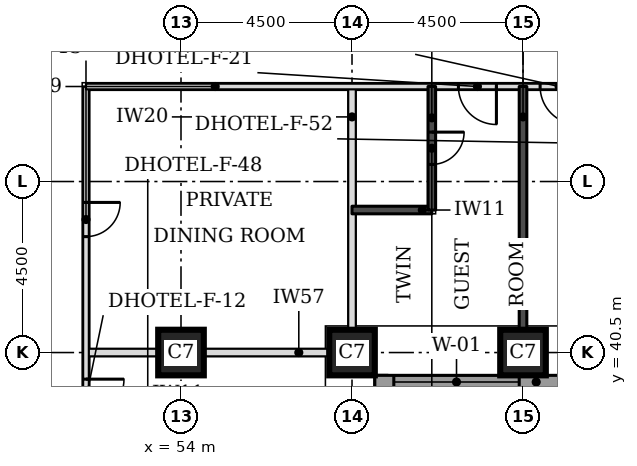
"""IFC4 building model, lengths in metres.
Left out: names, types, materials, properties, quantities, classifications, styles, units other than length and angle.
Written with IfcOpenShell. Run it as: python <this file> out.ifc"""

import sys

from ifc_helpers import new_model, si_unit, direction, frame, frame_2d, origin, origin_2d, place, context, subcontext, project, spatial, rectangle, extrude, element, fill, save


model = new_model("IFC4")
c1 = context("Model", 3, precision=1e-05, world=origin(), true_north=direction((0.0, 1.0)))
c2 = subcontext(c1, "Body", "Model", "MODEL_VIEW")
j1 = project(units=[si_unit("LENGTHUNIT", "METRE"), si_unit("PLANEANGLEUNIT", "RADIAN")], contexts=[c1])
p1 = place(None, origin())
s1 = spatial("IfcSite", under=j1, at=p1, CompositionType="ELEMENT")
p2 = place(p1, origin())
s2 = spatial("IfcBuilding", under=s1, at=p2, CompositionType="ELEMENT")
p3 = place(p2, frame((0.0, 0.0, 42.9)))
s3 = spatial("IfcBuildingStorey", under=s2, at=p3, CompositionType="ELEMENT", Elevation=42.9)
for number, where, z_axis, x_axis in (
    (1, (54.0, 40.5, 0.0), (0.0, 0.0, 1.0), (1.0, 0.0, 0.0)),
    (2, (58.5, 40.5, 0.0), (0.0, 0.0, 1.0), (1.0, 0.0, 0.0)),
    (3, (63.0, 40.5, 0.0), (0.0, 0.0, 1.0), (1.0, 0.0, 0.0)),
):
    element("IfcColumn", number, at=place(p3, frame(where, z_axis=z_axis, x_axis=x_axis)), inside=s3, PredefinedType="COLUMN", context=c2, shape_type="SweptSolid", body=[
        extrude(rectangle(XDim=1.2, YDim=1.2, at=origin_2d()), origin(), (0.0, 0.0, 1.0), 3.3),
    ])
p4 = place(p3, frame((59.275, 22.106, 0.0), z_axis=(0.0, 0.0, 1.0), x_axis=(0.0, 1.0, 0.0)))
e4 = element("IfcWall", 4, at=p4, inside=s3, PredefinedType="STANDARD", context=c2, shape_type="SweptSolid", body=[
    extrude(rectangle(XDim=17.793, YDim=0.35, at=frame_2d((8.897, 0.0))), origin(), (0.0, 0.0, 1.0), 3.055),
])
p5 = place(p4, frame((5.493, 0.0, 0.8)))
e5 = element("IfcOpeningElement", 5, at=p5, cuts=e4, PredefinedType="OPENING", context=c2, shape_type="SweptSolid", body=[
    extrude(rectangle(XDim=3.3, YDim=1.5, at=frame_2d((1.65, 0.75))), frame((0.0, 0.185, 0.0), z_axis=(0.0, -1.0, 0.0), x_axis=(1.0, 0.0, 0.0)), (0.0, 0.0, 1.0), 0.37),
])
p6 = place(p4, frame((13.993, 0.0, 0.8)))
e6 = element("IfcOpeningElement", 6, at=p6, cuts=e4, PredefinedType="OPENING", context=c2, shape_type="SweptSolid", body=[
    extrude(rectangle(XDim=3.3, YDim=1.5, at=frame_2d((1.65, 0.75))), frame((0.0, 0.185, 0.0), z_axis=(0.0, -1.0, 0.0), x_axis=(1.0, 0.0, 0.0)), (0.0, 0.0, 1.0), 0.37),
])
p7 = place(p3, frame((59.1, 39.725, 0.0), z_axis=(0.0, 0.0, 1.0), x_axis=(1.0, 0.0, 0.0)))
e7 = element("IfcWall", 7, at=p7, inside=s3, PredefinedType="STANDARD", context=c2, shape_type="SweptSolid", body=[
    extrude(rectangle(XDim=13.293, YDim=0.35, at=frame_2d((6.647, 0.0))), origin(), (0.0, 0.0, 1.0), 3.055),
])
p8 = place(p7, frame((0.5, 0.0, 0.8)))
e8 = element("IfcOpeningElement", 8, at=p8, cuts=e7, PredefinedType="OPENING", context=c2, shape_type="SweptSolid", body=[
    extrude(rectangle(XDim=3.3, YDim=1.5, at=frame_2d((1.65, 0.75))), frame((0.0, 0.185, 0.0), z_axis=(0.0, -1.0, 0.0), x_axis=(1.0, 0.0, 0.0)), (0.0, 0.0, 1.0), 0.37),
])
p9 = place(p3, frame((51.5, 40.5, 0.0), z_axis=(0.0, 0.0, 1.0), x_axis=(1.0, 0.0, 0.0)))
e9 = element("IfcWall", 9, at=p9, inside=s3, PredefinedType="PARTITIONING", context=c2, shape_type="SweptSolid", body=[
    extrude(rectangle(XDim=6.4, YDim=0.2, at=frame_2d((3.2, 0.0))), origin(), (0.0, 0.0, 1.0), 2.33),
])
p10 = place(p3, frame((58.5, 41.1, 0.0), z_axis=(0.0, 0.0, 1.0), x_axis=(0.0, 1.0, 0.0)))
e10 = element("IfcWall", 10, at=p10, inside=s3, PredefinedType="PARTITIONING", context=c2, shape_type="SweptSolid", body=[
    extrude(rectangle(XDim=6.4, YDim=0.2, at=frame_2d((3.2, 0.0))), origin(), (0.0, 0.0, 1.0), 3.08),
])
p11 = place(p3, frame((51.5, 23.65, 0.0), z_axis=(0.0, 0.0, 1.0), x_axis=(0.0, 1.0, 0.0)))
e11 = element("IfcWall", 11, at=p11, inside=s3, PredefinedType="PARTITIONING", context=c2, shape_type="SweptSolid", body=[
    extrude(rectangle(XDim=23.85, YDim=0.15, at=frame_2d((11.925, 0.0))), origin(), (0.0, 0.0, 1.0), 3.08),
])
p12 = place(p11, frame((1.65, 0.0, 0.0)))
e12 = element("IfcOpeningElement", 12, at=p12, cuts=e11, PredefinedType="OPENING", context=c2, shape_type="SweptSolid", body=[
    extrude(rectangle(XDim=1.0, YDim=2.1, at=frame_2d((0.5, 1.05))), frame((0.0, 0.085, 0.0), z_axis=(0.0, -1.0, 0.0), x_axis=(1.0, 0.0, 0.0)), (0.0, 0.0, 1.0), 0.17),
])
p13 = place(p11, frame((5.75, 0.0, 0.0)))
e13 = element("IfcOpeningElement", 13, at=p13, cuts=e11, PredefinedType="OPENING", context=c2, shape_type="SweptSolid", body=[
    extrude(rectangle(XDim=1.0, YDim=2.1, at=frame_2d((0.5, 1.05))), frame((0.0, 0.085, 0.0), z_axis=(0.0, -1.0, 0.0), x_axis=(1.0, 0.0, 0.0)), (0.0, 0.0, 1.0), 0.17),
])
p14 = place(p11, frame((15.15, 0.0, 0.0)))
e14 = element("IfcOpeningElement", 14, at=p14, cuts=e11, PredefinedType="OPENING", context=c2, shape_type="SweptSolid", body=[
    extrude(rectangle(XDim=1.0, YDim=2.1, at=frame_2d((0.5, 1.05))), frame((0.0, 0.085, 0.0), z_axis=(0.0, -1.0, 0.0), x_axis=(1.0, 0.0, 0.0)), (0.0, 0.0, 1.0), 0.17),
])
p15 = place(p11, frame((19.9, 0.0, 0.0)))
e15 = element("IfcOpeningElement", 15, at=p15, cuts=e11, PredefinedType="OPENING", context=c2, shape_type="SweptSolid", body=[
    extrude(rectangle(XDim=0.9, YDim=2.1, at=frame_2d((0.45, 1.05))), frame((0.0, 0.085, 0.0), z_axis=(0.0, -1.0, 0.0), x_axis=(1.0, 0.0, 0.0)), (0.0, 0.0, 1.0), 0.17),
])
p16 = place(p3, frame((51.5, 47.5, 0.0), z_axis=(0.0, 0.0, 1.0), x_axis=(1.0, 0.0, 0.0)))
e16 = element("IfcWall", 16, at=p16, inside=s3, PredefinedType="PARTITIONING", context=c2, shape_type="SweptSolid", body=[
    extrude(rectangle(XDim=18.0, YDim=0.15, at=frame_2d((9.0, 0.0))), origin(), (0.0, 0.0, 1.0), 3.08),
])
p17 = place(p16, frame((11.95, 0.0, 0.0)))
e17 = element("IfcOpeningElement", 17, at=p17, cuts=e16, PredefinedType="OPENING", context=c2, shape_type="SweptSolid", body=[
    extrude(rectangle(XDim=1.0, YDim=2.1, at=frame_2d((0.5, 1.05))), frame((0.0, 0.085, 0.0), z_axis=(0.0, -1.0, 0.0), x_axis=(1.0, 0.0, 0.0)), (0.0, 0.0, 1.0), 0.17),
])
p18 = place(p16, frame((9.8, 0.0, 0.0)))
e18 = element("IfcOpeningElement", 18, at=p18, cuts=e16, PredefinedType="OPENING", context=c2, shape_type="SweptSolid", body=[
    extrude(rectangle(XDim=1.0, YDim=2.1, at=frame_2d((0.5, 1.05))), frame((0.0, 0.085, 0.0), z_axis=(0.0, -1.0, 0.0), x_axis=(1.0, 0.0, 0.0)), (0.0, 0.0, 1.0), 0.17),
])
p19 = place(p16, frame((16.5, 0.0, 0.0)))
e19 = element("IfcOpeningElement", 19, at=p19, cuts=e16, PredefinedType="OPENING", context=c2, shape_type="SweptSolid", body=[
    extrude(rectangle(XDim=1.0, YDim=2.1, at=frame_2d((0.5, 1.05))), frame((0.0, 0.085, 0.0), z_axis=(0.0, -1.0, 0.0), x_axis=(1.0, 0.0, 0.0)), (0.0, 0.0, 1.0), 0.17),
])
p20 = place(p3, frame((63.0, 41.1, 0.0), z_axis=(0.0, 0.0, 1.0), x_axis=(0.0, 1.0, 0.0)))
e20 = element("IfcWall", 20, at=p20, inside=s3, PredefinedType="SOLIDWALL", context=c2, shape_type="SweptSolid", body=[
    extrude(rectangle(XDim=6.4, YDim=0.2, at=frame_2d((3.2, 0.0))), origin(), (0.0, 0.0, 1.0), 3.08),
])
p21 = place(p3, frame((58.5, 44.25, 0.0), z_axis=(0.0, 0.0, 1.0), x_axis=(1.0, 0.0, 0.0)))
e21 = element("IfcWall", 21, at=p21, inside=s3, PredefinedType="SOLIDWALL", context=c2, shape_type="SweptSolid", body=[
    extrude(rectangle(XDim=2.1, YDim=0.2, at=frame_2d((1.05, 0.0))), origin(), (0.0, 0.0, 1.0), 3.08),
])
p22 = place(p3, frame((60.6, 44.25, 0.0), z_axis=(0.0, 0.0, 1.0), x_axis=(0.0, 1.0, 0.0)))
e22 = element("IfcWall", 22, at=p22, inside=s3, PredefinedType="SOLIDWALL", context=c2, shape_type="SweptSolid", body=[
    extrude(rectangle(XDim=3.25, YDim=0.2, at=frame_2d((1.625, 0.0))), origin(), (0.0, 0.0, 1.0), 3.08),
])
p23 = place(p22, frame((1.2, 0.0, 0.0)))
e23 = element("IfcOpeningElement", 23, at=p23, cuts=e22, PredefinedType="OPENING", context=c2, shape_type="SweptSolid", body=[
    extrude(rectangle(XDim=0.85, YDim=2.1, at=frame_2d((0.425, 1.05))), frame((0.0, 0.11, 0.0), z_axis=(0.0, -1.0, 0.0), x_axis=(1.0, 0.0, 0.0)), (0.0, 0.0, 1.0), 0.22),
])
p24 = place(p8, origin())
e24 = element("IfcWindow", 24, at=p24, inside=s3, PartitioningType="SINGLE_PANEL", PredefinedType="WINDOW", context=c2, shape_type="SweptSolid", body=[
    extrude(rectangle(XDim=3.3, YDim=1.5, at=frame_2d((1.65, 0.75))), frame((0.0, 0.085, 0.0), z_axis=(0.0, -1.0, 0.0), x_axis=(1.0, 0.0, 0.0)), (0.0, 0.0, 1.0), 0.06),
])
fill(e8, e24)
p25 = place(p14, frame((1.0, 0.0, 0.0), z_axis=(0.0, 0.0, 1.0), x_axis=(-1.0, 0.0, 0.0)))
e25 = element("IfcDoor", 25, at=p25, inside=s3, OperationType="SINGLE_SWING_LEFT", PredefinedType="DOOR", context=c2, shape_type="SweptSolid", body=[
    extrude(rectangle(XDim=1.0, YDim=2.1, at=frame_2d((0.5, 1.05))), frame((0.0, 0.025, 0.0), z_axis=(0.0, -1.0, 0.0), x_axis=(1.0, 0.0, 0.0)), (0.0, 0.0, 1.0), 0.05),
])
fill(e14, e25)
p26 = place(p17, frame((1.0, 0.0, 0.0), z_axis=(0.0, 0.0, 1.0), x_axis=(-1.0, 0.0, 0.0)))
e26 = element("IfcDoor", 26, at=p26, inside=s3, OperationType="SINGLE_SWING_LEFT", PredefinedType="DOOR", context=c2, shape_type="SweptSolid", body=[
    extrude(rectangle(XDim=1.0, YDim=2.1, at=frame_2d((0.5, 1.05))), frame((0.0, 0.025, 0.0), z_axis=(0.0, -1.0, 0.0), x_axis=(1.0, 0.0, 0.0)), (0.0, 0.0, 1.0), 0.05),
])
fill(e17, e26)
p27 = place(p18, frame((1.0, 0.0, 0.0), z_axis=(0.0, 0.0, 1.0), x_axis=(-1.0, 0.0, 0.0)))
e27 = element("IfcDoor", 27, at=p27, inside=s3, OperationType="SINGLE_SWING_LEFT", PredefinedType="DOOR", context=c2, shape_type="SweptSolid", body=[
    extrude(rectangle(XDim=1.0, YDim=2.1, at=frame_2d((0.5, 1.05))), frame((0.0, 0.025, 0.0), z_axis=(0.0, -1.0, 0.0), x_axis=(1.0, 0.0, 0.0)), (0.0, 0.0, 1.0), 0.05),
])
fill(e18, e27)
p28 = place(p23, frame((0.85, 0.0, 0.0), z_axis=(0.0, 0.0, 1.0), x_axis=(-1.0, 0.0, 0.0)))
e28 = element("IfcDoor", 28, at=p28, inside=s3, OperationType="SINGLE_SWING_LEFT", PredefinedType="DOOR", context=c2, shape_type="SweptSolid", body=[
    extrude(rectangle(XDim=0.85, YDim=2.1, at=frame_2d((0.425, 1.05))), frame((0.0, 0.025, 0.0), z_axis=(0.0, -1.0, 0.0), x_axis=(1.0, 0.0, 0.0)), (0.0, 0.0, 1.0), 0.05),
])
fill(e23, e28)
p29 = place(p15, frame((0.9, 0.0, 0.0), z_axis=(0.0, 0.0, 1.0), x_axis=(-1.0, 0.0, 0.0)))
e29 = element("IfcDoor", 29, at=p29, inside=s3, OperationType="SINGLE_SWING_LEFT", PredefinedType="DOOR", context=c2, shape_type="SweptSolid", body=[
    extrude(rectangle(XDim=0.9, YDim=2.1, at=frame_2d((0.45, 1.05))), frame((0.0, 0.025, 0.0), z_axis=(0.0, -1.0, 0.0), x_axis=(1.0, 0.0, 0.0)), (0.0, 0.0, 1.0), 0.05),
])
fill(e15, e29)
save(model, sys.argv[1])
